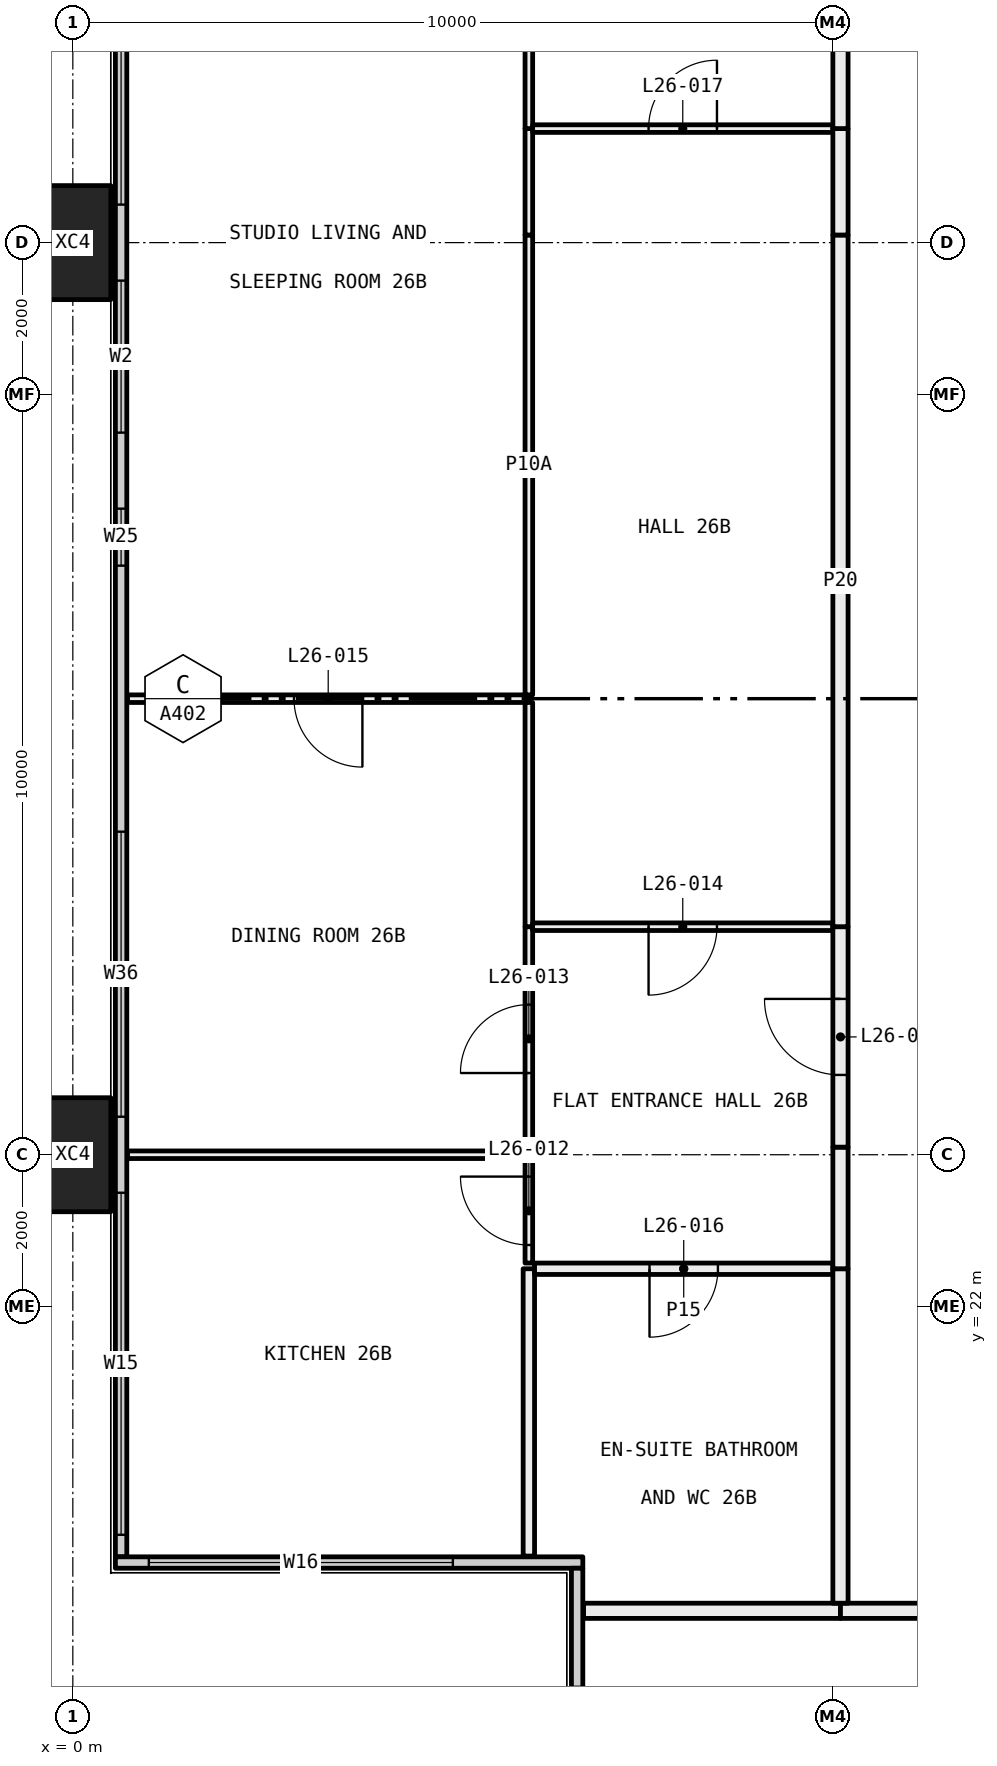
"""IFC4 building model, lengths in metres.
Left out: names, types, materials, properties, quantities, classifications, styles, units other than length and angle.
Written with IfcOpenShell. Run it as: python <this file> out.ifc"""

import sys

from ifc_helpers import new_model, si_unit, direction, frame, frame_2d, origin, origin_2d, place, context, subcontext, project, spatial, rectangle, hollow_rectangle, extrude, element, fill, save


model = new_model("IFC4")
c1 = context("Model", 3, precision=1e-05, world=origin(), true_north=direction((0.0, 1.0)))
c2 = subcontext(c1, "Body", "Model", "MODEL_VIEW")
j1 = project(units=[si_unit("LENGTHUNIT", "METRE"), si_unit("PLANEANGLEUNIT", "RADIAN")], contexts=[c1])
p1 = place(None, origin())
s1 = spatial("IfcSite", under=j1, at=p1, CompositionType="ELEMENT")
p2 = place(p1, origin())
s2 = spatial("IfcBuilding", under=s1, at=p2, CompositionType="ELEMENT")
p3 = place(p2, frame((0.0, 0.0, 103.5)))
s3 = spatial("IfcBuildingStorey", under=s2, at=p3, CompositionType="ELEMENT", Elevation=103.5)
for number, where, z_axis, x_axis in (
    (1, (0.0, 24.0, -0.4), (0.0, 0.0, 1.0), (0.0, 1.0, 0.0)),
    (2, (0.0, 36.0, -0.4), (0.0, 0.0, 1.0), (0.0, 1.0, 0.0)),
):
    element("IfcColumn", number, at=place(p3, frame(where, z_axis=z_axis, x_axis=x_axis)), inside=s3, PredefinedType="COLUMN", context=c2, shape_type="SweptSolid", body=[
        extrude(hollow_rectangle(XDim=1.5, YDim=1.0, WallThickness=0.06, at=origin_2d()), origin(), (0.0, 0.0, 1.0), 3.45),
    ])
p4 = place(p3, frame((0.635, 18.71, 0.0), z_axis=(0.0, 0.0, 1.0), x_axis=(0.0, 1.0, 0.0)))
e3 = element("IfcWall", 3, at=p4, inside=s3, PredefinedType="ELEMENTEDWALL", context=c2, shape_type="SweptSolid", body=[
    extrude(rectangle(XDim=22.58, YDim=0.15, at=frame_2d((11.29, 0.0))), origin(), (0.0, 0.0, 1.0), 3.05),
])
p5 = place(p4, frame((0.29, 0.0, 0.45)))
e4 = element("IfcOpeningElement", 4, at=p5, cuts=e3, PredefinedType="OPENING", context=c2, shape_type="SweptSolid", body=[
    extrude(rectangle(XDim=4.5, YDim=2.55, at=frame_2d((2.25, 1.275))), frame((0.0, 0.085, 0.0), z_axis=(0.0, -1.0, 0.0), x_axis=(1.0, 0.0, 0.0)), (0.0, 0.0, 1.0), 0.17),
])
p6 = place(p4, frame((5.79, 0.0, 0.45)))
e5 = element("IfcOpeningElement", 5, at=p6, cuts=e3, PredefinedType="OPENING", context=c2, shape_type="SweptSolid", body=[
    extrude(rectangle(XDim=3.75, YDim=2.55, at=frame_2d((1.875, 1.275))), frame((0.0, 0.085, 0.0), z_axis=(0.0, -1.0, 0.0), x_axis=(1.0, 0.0, 0.0)), (0.0, 0.0, 1.0), 0.17),
])
p7 = place(p4, frame((13.04, 0.0, 0.45)))
e6 = element("IfcOpeningElement", 6, at=p7, cuts=e3, PredefinedType="OPENING", context=c2, shape_type="SweptSolid", body=[
    extrude(rectangle(XDim=0.75, YDim=2.55, at=frame_2d((0.375, 1.275))), frame((0.0, 0.085, 0.0), z_axis=(0.0, -1.0, 0.0), x_axis=(1.0, 0.0, 0.0)), (0.0, 0.0, 1.0), 0.17),
])
p8 = place(p4, frame((14.79, 0.0, 0.45)))
e7 = element("IfcOpeningElement", 7, at=p8, cuts=e3, PredefinedType="OPENING", context=c2, shape_type="SweptSolid", body=[
    extrude(rectangle(XDim=2.0, YDim=2.55, at=frame_2d((1.0, 1.275))), frame((0.0, 0.085, 0.0), z_axis=(0.0, -1.0, 0.0), x_axis=(1.0, 0.0, 0.0)), (0.0, 0.0, 1.0), 0.17),
])
p9 = place(p4, frame((17.79, 0.0, 0.45)))
e8 = element("IfcOpeningElement", 8, at=p9, cuts=e3, PredefinedType="OPENING", context=c2, shape_type="SweptSolid", body=[
    extrude(rectangle(XDim=4.5, YDim=2.55, at=frame_2d((2.25, 1.275))), frame((0.0, 0.085, 0.0), z_axis=(0.0, -1.0, 0.0), x_axis=(1.0, 0.0, 0.0)), (0.0, 0.0, 1.0), 0.17),
])
p10 = place(p3, frame((0.56, 18.635, 0.0), z_axis=(0.0, 0.0, 1.0), x_axis=(1.0, 0.0, 0.0)))
e9 = element("IfcWall", 9, at=p10, inside=s3, PredefinedType="ELEMENTEDWALL", context=c2, shape_type="SweptSolid", body=[
    extrude(rectangle(XDim=6.15, YDim=0.15, at=frame_2d((3.075, 0.0))), origin(), (0.0, 0.0, 1.0), 3.05),
])
p11 = place(p10, frame((0.44, 0.0, 0.45)))
e10 = element("IfcOpeningElement", 10, at=p11, cuts=e9, PredefinedType="OPENING", context=c2, shape_type="SweptSolid", body=[
    extrude(rectangle(XDim=4.0, YDim=2.55, at=frame_2d((2.0, 1.275))), frame((0.0, 0.085, 0.0), z_axis=(0.0, -1.0, 0.0), x_axis=(1.0, 0.0, 0.0)), (0.0, 0.0, 1.0), 0.17),
])
p12 = place(p3, frame((6.635, 12.71, 0.0), z_axis=(0.0, 0.0, 1.0), x_axis=(0.0, 1.0, 0.0)))
e11 = element("IfcWall", 11, at=p12, inside=s3, PredefinedType="ELEMENTEDWALL", context=c2, shape_type="SweptSolid", body=[
    extrude(rectangle(XDim=5.85, YDim=0.15, at=frame_2d((2.925, 0.0))), origin(), (0.0, 0.0, 1.0), 3.05),
])
p13 = place(p12, frame((0.29, 0.0, 0.45)))
e12 = element("IfcOpeningElement", 12, at=p13, cuts=e11, PredefinedType="OPENING", context=c2, shape_type="SweptSolid", body=[
    extrude(rectangle(XDim=4.0, YDim=2.55, at=frame_2d((2.0, 1.275))), frame((0.0, 0.085, 0.0), z_axis=(0.0, -1.0, 0.0), x_axis=(1.0, 0.0, 0.0)), (0.0, 0.0, 1.0), 0.17),
])
p14 = place(p3, frame((10.1, 18.0, 0.0), z_axis=(0.0, 0.0, 1.0), x_axis=(-1.0, 0.0, 0.0)))
e13 = element("IfcWall", 13, at=p14, inside=s3, PredefinedType="PARTITIONING", context=c2, shape_type="SweptSolid", body=[
    extrude(rectangle(XDim=3.38, YDim=0.2, at=frame_2d((1.69, 0.0))), origin(), (0.0, 0.0, 1.0), 3.05),
])
p15 = place(p3, frame((12.0, 18.0, 0.0), z_axis=(0.0, 0.0, 1.0), x_axis=(-1.0, 0.0, 0.0)))
e14 = element("IfcWall", 14, at=p15, inside=s3, PredefinedType="PARTITIONING", context=c2, shape_type="SweptSolid", body=[
    extrude(rectangle(XDim=1.9, YDim=0.2, at=frame_2d((0.95, 0.0))), origin(), (0.0, 0.0, 1.0), 3.05),
])
p16 = place(p3, frame((6.0, 24.0, 0.0), z_axis=(0.0, 0.0, 1.0), x_axis=(-1.0, 0.0, 0.0)))
e15 = element("IfcWall", 15, at=p16, inside=s3, PredefinedType="PARTITIONING", context=c2, shape_type="SweptSolid", body=[
    extrude(rectangle(XDim=5.28, YDim=0.1, at=frame_2d((2.64, 0.0))), origin(), (0.0, 0.0, 1.0), 2.45),
])
p17 = place(p3, frame((6.0, 18.72, 0.0), z_axis=(0.0, 0.0, 1.0), x_axis=(0.0, 1.0, 0.0)))
e16 = element("IfcWall", 16, at=p17, inside=s3, PredefinedType="PARTITIONING", context=c2, shape_type="SweptSolid", body=[
    extrude(rectangle(XDim=3.78, YDim=0.15, at=frame_2d((1.89, 0.0))), origin(), (0.0, 0.0, 1.0), 3.05),
])
p18 = place(p3, frame((6.0, 22.575, 0.0), z_axis=(0.0, 0.0, 1.0), x_axis=(0.0, 1.0, 0.0)))
e17 = element("IfcWall", 17, at=p18, inside=s3, PredefinedType="PARTITIONING", context=c2, shape_type="SweptSolid", body=[
    extrude(rectangle(XDim=1.375, YDim=0.1, at=frame_2d((0.688, 0.0))), origin(), (0.0, 0.0, 1.0), 2.45),
])
p19 = place(p18, frame((0.238, 0.0, 0.0)))
e18 = element("IfcOpeningElement", 18, at=p19, cuts=e17, PredefinedType="OPENING", context=c2, shape_type="SweptSolid", body=[
    extrude(rectangle(XDim=0.9, YDim=2.1, at=frame_2d((0.45, 1.05))), frame((0.0, 0.06, 0.0), z_axis=(0.0, -1.0, 0.0), x_axis=(1.0, 0.0, 0.0)), (0.0, 0.0, 1.0), 0.12),
])
p20 = place(p3, frame((6.0, 30.0, 0.0), z_axis=(0.0, 0.0, 1.0), x_axis=(-1.0, 0.0, 0.0)))
e19 = element("IfcWall", 19, at=p20, inside=s3, PredefinedType="PARTITIONING", context=c2, shape_type="SweptSolid", body=[
    extrude(rectangle(XDim=5.28, YDim=0.1, at=frame_2d((2.64, 0.0))), origin(), (0.0, 0.0, 1.0), 3.05),
])
p21 = place(p20, frame((2.19, 0.0, 0.0)))
e20 = element("IfcOpeningElement", 20, at=p21, cuts=e19, PredefinedType="OPENING", context=c2, shape_type="SweptSolid", body=[
    extrude(rectangle(XDim=0.9, YDim=2.1, at=frame_2d((0.45, 1.05))), frame((0.0, 0.06, 0.0), z_axis=(0.0, -1.0, 0.0), x_axis=(1.0, 0.0, 0.0)), (0.0, 0.0, 1.0), 0.12),
])
p22 = place(p3, frame((6.0, 24.05, 0.0), z_axis=(0.0, 0.0, 1.0), x_axis=(0.0, 1.0, 0.0)))
e21 = element("IfcWall", 21, at=p22, inside=s3, PredefinedType="PARTITIONING", context=c2, shape_type="SweptSolid", body=[
    extrude(rectangle(XDim=2.95, YDim=0.1, at=frame_2d((1.475, 0.0))), origin(), (0.0, 0.0, 1.0), 2.45),
])
p23 = place(p22, frame((1.025, 0.0, 0.0)))
e22 = element("IfcOpeningElement", 22, at=p23, cuts=e21, PredefinedType="OPENING", context=c2, shape_type="SweptSolid", body=[
    extrude(rectangle(XDim=0.9, YDim=2.1, at=frame_2d((0.45, 1.05))), frame((0.0, 0.06, 0.0), z_axis=(0.0, -1.0, 0.0), x_axis=(1.0, 0.0, 0.0)), (0.0, 0.0, 1.0), 0.12),
])
p24 = place(p3, frame((6.0, 27.0, 0.0), z_axis=(0.0, 0.0, 1.0), x_axis=(0.0, 1.0, 0.0)))
e23 = element("IfcWall", 23, at=p24, inside=s3, PredefinedType="PARTITIONING", context=c2, shape_type="SweptSolid", body=[
    extrude(rectangle(XDim=2.95, YDim=0.1, at=frame_2d((1.475, 0.0))), origin(), (0.0, 0.0, 1.0), 3.05),
])
p25 = place(p3, frame((6.0, 30.05, 0.0), z_axis=(0.0, 0.0, 1.0), x_axis=(0.0, 1.0, 0.0)))
e24 = element("IfcWall", 24, at=p25, inside=s3, PredefinedType="PARTITIONING", context=c2, shape_type="SweptSolid", body=[
    extrude(rectangle(XDim=6.05, YDim=0.1, at=frame_2d((3.025, 0.0))), origin(), (0.0, 0.0, 1.0), 2.45),
])
p26 = place(p3, frame((6.0, 36.1, 0.0), z_axis=(0.0, 0.0, 1.0), x_axis=(0.0, 1.0, 0.0)))
e25 = element("IfcWall", 25, at=p26, inside=s3, PredefinedType="PARTITIONING", context=c2, shape_type="SweptSolid", body=[
    extrude(rectangle(XDim=1.4, YDim=0.1, at=frame_2d((0.7, 0.0))), origin(), (0.0, 0.0, 1.0), 3.05),
])
p27 = place(p3, frame((6.0, 37.5, 0.0), z_axis=(0.0, 0.0, 1.0), x_axis=(0.0, 1.0, 0.0)))
e26 = element("IfcWall", 26, at=p27, inside=s3, PredefinedType="PARTITIONING", context=c2, shape_type="SweptSolid", body=[
    extrude(rectangle(XDim=3.78, YDim=0.1, at=frame_2d((1.89, 0.0))), origin(), (0.0, 0.0, 1.0), 3.05),
])
p28 = place(p3, frame((10.0, 22.5, 0.0), z_axis=(0.0, 0.0, 1.0), x_axis=(-1.0, 0.0, 0.0)))
e27 = element("IfcWall", 27, at=p28, inside=s3, PredefinedType="PARTITIONING", context=c2, shape_type="SweptSolid", body=[
    extrude(rectangle(XDim=3.925, YDim=0.15, at=frame_2d((1.962, 0.0))), origin(), (0.0, 0.0, 1.0), 3.05),
])
p29 = place(p28, frame((1.512, 0.0, 0.0)))
e28 = element("IfcOpeningElement", 28, at=p29, cuts=e27, PredefinedType="OPENING", context=c2, shape_type="SweptSolid", body=[
    extrude(rectangle(XDim=0.9, YDim=2.1, at=frame_2d((0.45, 1.05))), frame((0.0, 0.085, 0.0), z_axis=(0.0, -1.0, 0.0), x_axis=(1.0, 0.0, 0.0)), (0.0, 0.0, 1.0), 0.17),
])
p30 = place(p3, frame((10.1, 18.1, 0.0), z_axis=(0.0, 0.0, 1.0), x_axis=(0.0, 1.0, 0.0)))
e29 = element("IfcWall", 29, at=p30, inside=s3, PredefinedType="PARTITIONING", context=c2, shape_type="SweptSolid", body=[
    extrude(rectangle(XDim=4.4, YDim=0.2, at=frame_2d((2.2, 0.0))), origin(), (0.0, 0.0, 1.0), 3.05),
])
p31 = place(p3, frame((10.0, 27.0, 0.0), z_axis=(0.0, 0.0, 1.0), x_axis=(-1.0, 0.0, 0.0)))
e30 = element("IfcWall", 30, at=p31, inside=s3, PredefinedType="PARTITIONING", context=c2, shape_type="SweptSolid", body=[
    extrude(rectangle(XDim=3.95, YDim=0.1, at=frame_2d((1.975, 0.0))), origin(), (0.0, 0.0, 1.0), 3.05),
])
p32 = place(p31, frame((1.525, 0.0, 0.0)))
e31 = element("IfcOpeningElement", 31, at=p32, cuts=e30, PredefinedType="OPENING", context=c2, shape_type="SweptSolid", body=[
    extrude(rectangle(XDim=0.9, YDim=2.1, at=frame_2d((0.45, 1.05))), frame((0.0, 0.06, 0.0), z_axis=(0.0, -1.0, 0.0), x_axis=(1.0, 0.0, 0.0)), (0.0, 0.0, 1.0), 0.12),
])
p33 = place(p3, frame((10.1, 22.5, 0.0), z_axis=(0.0, 0.0, 1.0), x_axis=(0.0, 1.0, 0.0)))
e32 = element("IfcWall", 32, at=p33, inside=s3, PredefinedType="PARTITIONING", context=c2, shape_type="SweptSolid", body=[
    extrude(rectangle(XDim=1.6, YDim=0.2, at=frame_2d((0.8, 0.0))), origin(), (0.0, 0.0, 1.0), 2.45),
])
p34 = place(p3, frame((10.1, 24.1, 0.0), z_axis=(0.0, 0.0, 1.0), x_axis=(0.0, 1.0, 0.0)))
e33 = element("IfcWall", 33, at=p34, inside=s3, PredefinedType="PARTITIONING", context=c2, shape_type="SweptSolid", body=[
    extrude(rectangle(XDim=2.9, YDim=0.2, at=frame_2d((1.45, 0.0))), origin(), (0.0, 0.0, 1.0), 3.05),
])
p35 = place(p34, frame((0.95, 0.0, 0.0)))
e34 = element("IfcOpeningElement", 34, at=p35, cuts=e33, PredefinedType="OPENING", context=c2, shape_type="SweptSolid", body=[
    extrude(rectangle(XDim=1.0, YDim=2.1, at=frame_2d((0.5, 1.05))), frame((0.0, 0.11, 0.0), z_axis=(0.0, -1.0, 0.0), x_axis=(1.0, 0.0, 0.0)), (0.0, 0.0, 1.0), 0.22),
])
p36 = place(p3, frame((10.0, 37.5, 0.0), z_axis=(0.0, 0.0, 1.0), x_axis=(-1.0, 0.0, 0.0)))
e35 = element("IfcWall", 35, at=p36, inside=s3, PredefinedType="PARTITIONING", context=c2, shape_type="SweptSolid", body=[
    extrude(rectangle(XDim=3.95, YDim=0.1, at=frame_2d((1.975, 0.0))), origin(), (0.0, 0.0, 1.0), 3.05),
])
p37 = place(p36, frame((1.525, 0.0, 0.0)))
e36 = element("IfcOpeningElement", 36, at=p37, cuts=e35, PredefinedType="OPENING", context=c2, shape_type="SweptSolid", body=[
    extrude(rectangle(XDim=0.9, YDim=2.1, at=frame_2d((0.45, 1.05))), frame((0.0, 0.06, 0.0), z_axis=(0.0, -1.0, 0.0), x_axis=(1.0, 0.0, 0.0)), (0.0, 0.0, 1.0), 0.12),
])
p38 = place(p3, frame((10.1, 27.0, 0.0), z_axis=(0.0, 0.0, 1.0), x_axis=(0.0, 1.0, 0.0)))
e37 = element("IfcWall", 37, at=p38, inside=s3, PredefinedType="PARTITIONING", context=c2, shape_type="SweptSolid", body=[
    extrude(rectangle(XDim=9.1, YDim=0.2, at=frame_2d((4.55, 0.0))), origin(), (0.0, 0.0, 1.0), 2.45),
])
p39 = place(p3, frame((10.1, 36.1, 0.0), z_axis=(0.0, 0.0, 1.0), x_axis=(0.0, 1.0, 0.0)))
e38 = element("IfcWall", 38, at=p39, inside=s3, PredefinedType="PARTITIONING", context=c2, shape_type="SweptSolid", body=[
    extrude(rectangle(XDim=1.4, YDim=0.2, at=frame_2d((0.7, 0.0))), origin(), (0.0, 0.0, 1.0), 3.05),
])
p40 = place(p3, frame((10.1, 37.5, 0.0), z_axis=(0.0, 0.0, 1.0), x_axis=(0.0, 1.0, 0.0)))
e39 = element("IfcWall", 39, at=p40, inside=s3, PredefinedType="PARTITIONING", context=c2, shape_type="SweptSolid", body=[
    extrude(rectangle(XDim=4.4, YDim=0.2, at=frame_2d((2.2, 0.0))), origin(), (0.0, 0.0, 1.0), 3.05),
])
p41 = place(p5, origin())
e40 = element("IfcWindow", 40, at=p41, inside=s3, PartitioningType="SINGLE_PANEL", PredefinedType="WINDOW", context=c2, shape_type="SweptSolid", body=[
    extrude(rectangle(XDim=4.5, YDim=2.55, at=frame_2d((2.25, 1.275))), frame((0.0, 0.03, 0.0), z_axis=(0.0, -1.0, 0.0), x_axis=(1.0, 0.0, 0.0)), (0.0, 0.0, 1.0), 0.06),
])
fill(e4, e40)
p42 = place(p6, origin())
e41 = element("IfcWindow", 41, at=p42, inside=s3, PartitioningType="SINGLE_PANEL", PredefinedType="WINDOW", context=c2, shape_type="SweptSolid", body=[
    extrude(rectangle(XDim=3.75, YDim=2.55, at=frame_2d((1.875, 1.275))), frame((0.0, 0.03, 0.0), z_axis=(0.0, -1.0, 0.0), x_axis=(1.0, 0.0, 0.0)), (0.0, 0.0, 1.0), 0.06),
])
fill(e5, e41)
p43 = place(p7, origin())
e42 = element("IfcWindow", 42, at=p43, inside=s3, PartitioningType="SINGLE_PANEL", PredefinedType="WINDOW", context=c2, shape_type="SweptSolid", body=[
    extrude(rectangle(XDim=0.75, YDim=2.55, at=frame_2d((0.375, 1.275))), frame((0.0, 0.03, 0.0), z_axis=(0.0, -1.0, 0.0), x_axis=(1.0, 0.0, 0.0)), (0.0, 0.0, 1.0), 0.06),
])
fill(e6, e42)
p44 = place(p8, origin())
e43 = element("IfcWindow", 43, at=p44, inside=s3, PartitioningType="SINGLE_PANEL", PredefinedType="WINDOW", context=c2, shape_type="SweptSolid", body=[
    extrude(rectangle(XDim=2.0, YDim=2.55, at=frame_2d((1.0, 1.275))), frame((0.0, 0.03, 0.0), z_axis=(0.0, -1.0, 0.0), x_axis=(1.0, 0.0, 0.0)), (0.0, 0.0, 1.0), 0.06),
])
fill(e7, e43)
p45 = place(p9, origin())
e44 = element("IfcWindow", 44, at=p45, inside=s3, PartitioningType="SINGLE_PANEL", PredefinedType="WINDOW", context=c2, shape_type="SweptSolid", body=[
    extrude(rectangle(XDim=4.5, YDim=2.55, at=frame_2d((2.25, 1.275))), frame((0.0, 0.03, 0.0), z_axis=(0.0, -1.0, 0.0), x_axis=(1.0, 0.0, 0.0)), (0.0, 0.0, 1.0), 0.06),
])
fill(e8, e44)
p46 = place(p11, origin())
e45 = element("IfcWindow", 45, at=p46, inside=s3, PartitioningType="SINGLE_PANEL", PredefinedType="WINDOW", context=c2, shape_type="SweptSolid", body=[
    extrude(rectangle(XDim=4.0, YDim=2.55, at=frame_2d((2.0, 1.275))), frame((0.0, 0.03, 0.0), z_axis=(0.0, -1.0, 0.0), x_axis=(1.0, 0.0, 0.0)), (0.0, 0.0, 1.0), 0.06),
])
fill(e10, e45)
p47 = place(p35, origin())
e46 = element("IfcDoor", 46, at=p47, inside=s3, OperationType="SINGLE_SWING_LEFT", PredefinedType="DOOR", context=c2, shape_type="SweptSolid", body=[
    extrude(rectangle(XDim=1.0, YDim=2.1, at=frame_2d((0.5, 1.05))), frame((0.0, 0.025, 0.0), z_axis=(0.0, -1.0, 0.0), x_axis=(1.0, 0.0, 0.0)), (0.0, 0.0, 1.0), 0.05),
])
fill(e34, e46)
p48 = place(p19, origin())
e47 = element("IfcDoor", 47, at=p48, inside=s3, OperationType="SINGLE_SWING_LEFT", PredefinedType="DOOR", context=c2, shape_type="SweptSolid", body=[
    extrude(rectangle(XDim=0.9, YDim=2.1, at=frame_2d((0.45, 1.05))), frame((0.0, 0.025, 0.0), z_axis=(0.0, -1.0, 0.0), x_axis=(1.0, 0.0, 0.0)), (0.0, 0.0, 1.0), 0.05),
])
fill(e18, e47)
p49 = place(p23, origin())
e48 = element("IfcDoor", 48, at=p49, inside=s3, OperationType="SINGLE_SWING_RIGHT", PredefinedType="DOOR", context=c2, shape_type="SweptSolid", body=[
    extrude(rectangle(XDim=0.9, YDim=2.1, at=frame_2d((0.45, 1.05))), frame((0.0, 0.025, 0.0), z_axis=(0.0, -1.0, 0.0), x_axis=(1.0, 0.0, 0.0)), (0.0, 0.0, 1.0), 0.05),
])
fill(e22, e48)
p50 = place(p32, origin())
e49 = element("IfcDoor", 49, at=p50, inside=s3, OperationType="SINGLE_SWING_LEFT", PredefinedType="DOOR", context=c2, shape_type="SweptSolid", body=[
    extrude(rectangle(XDim=0.9, YDim=2.1, at=frame_2d((0.45, 1.05))), frame((0.0, 0.025, 0.0), z_axis=(0.0, -1.0, 0.0), x_axis=(1.0, 0.0, 0.0)), (0.0, 0.0, 1.0), 0.05),
])
fill(e31, e49)
p51 = place(p21, origin())
e50 = element("IfcDoor", 50, at=p51, inside=s3, OperationType="SINGLE_SWING_RIGHT", PredefinedType="DOOR", context=c2, shape_type="SweptSolid", body=[
    extrude(rectangle(XDim=0.9, YDim=2.1, at=frame_2d((0.45, 1.05))), frame((0.0, 0.025, 0.0), z_axis=(0.0, -1.0, 0.0), x_axis=(1.0, 0.0, 0.0)), (0.0, 0.0, 1.0), 0.05),
])
fill(e20, e50)
p52 = place(p29, origin())
e51 = element("IfcDoor", 51, at=p52, inside=s3, OperationType="SINGLE_SWING_LEFT", PredefinedType="DOOR", context=c2, shape_type="SweptSolid", body=[
    extrude(rectangle(XDim=0.9, YDim=2.1, at=frame_2d((0.45, 1.05))), frame((0.0, 0.025, 0.0), z_axis=(0.0, -1.0, 0.0), x_axis=(1.0, 0.0, 0.0)), (0.0, 0.0, 1.0), 0.05),
])
fill(e28, e51)
p53 = place(p37, frame((0.9, 0.0, 0.0), x_axis=(-1.0, 0.0, 0.0)))
e52 = element("IfcDoor", 52, at=p53, inside=s3, OperationType="SINGLE_SWING_LEFT", PredefinedType="DOOR", context=c2, shape_type="SweptSolid", body=[
    extrude(rectangle(XDim=0.9, YDim=2.1, at=frame_2d((0.45, 1.05))), frame((0.0, 0.025, 0.0), z_axis=(0.0, -1.0, 0.0), x_axis=(1.0, 0.0, 0.0)), (0.0, 0.0, 1.0), 0.05),
])
fill(e36, e52)
save(model, sys.argv[1])
